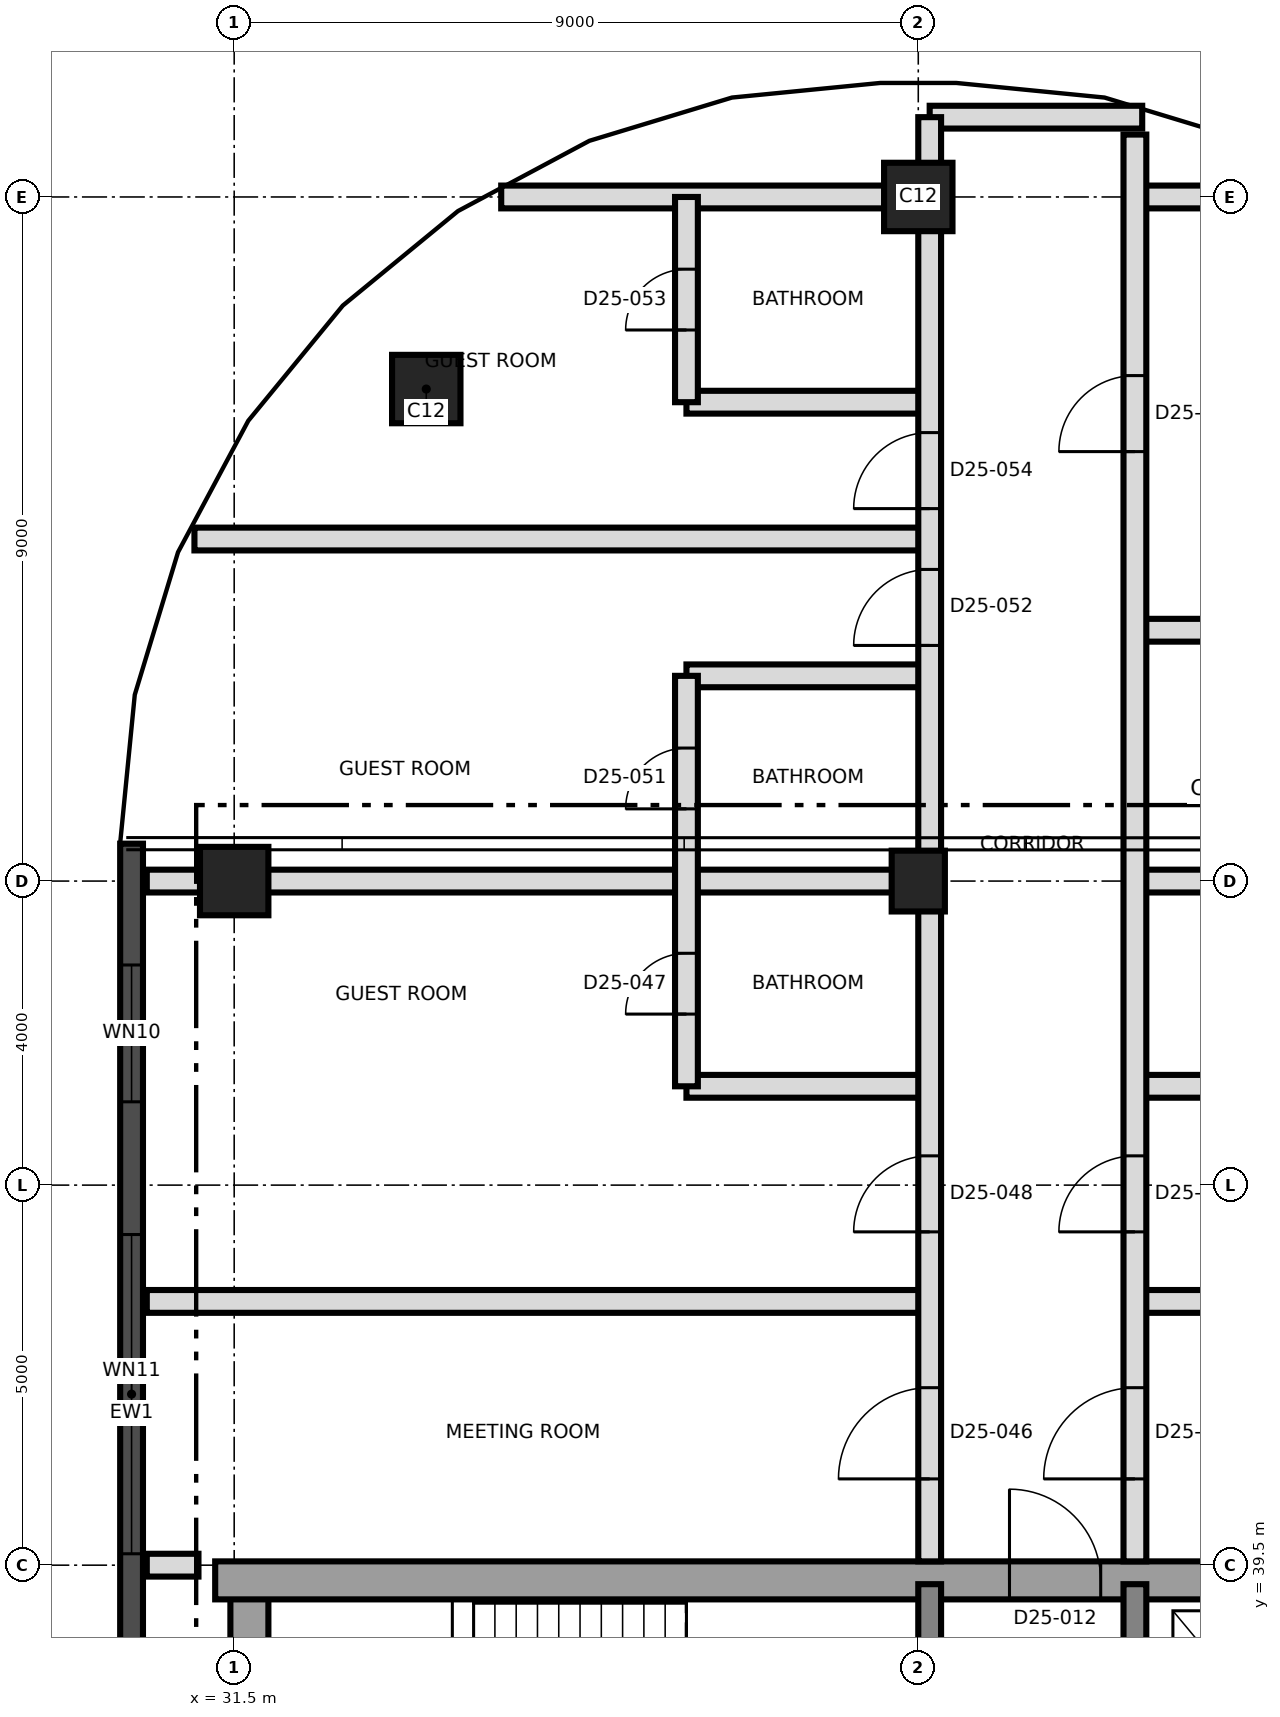
"""IFC4 building model, lengths in metres.
Left out: names, types, materials, properties, quantities, classifications, styles, units other than length and angle.
Written with IfcOpenShell. Run it as: python <this file> out.ifc"""

import sys

from ifc_helpers import new_model, si_unit, direction, frame, frame_2d, origin, origin_2d, place, context, subcontext, project, spatial, rectangle, extrude, element, fill, save


model = new_model("IFC4")
c1 = context("Model", 3, precision=1e-05, world=origin(), true_north=direction((0.0, 1.0)))
c2 = subcontext(c1, "Body", "Model", "MODEL_VIEW")
j1 = project(units=[si_unit("LENGTHUNIT", "METRE"), si_unit("PLANEANGLEUNIT", "RADIAN")], contexts=[c1])
p1 = place(None, origin())
s1 = spatial("IfcSite", under=j1, at=p1, CompositionType="ELEMENT")
p2 = place(p1, origin())
s2 = spatial("IfcBuilding", under=s1, at=p2, CompositionType="ELEMENT")
p3 = place(p2, frame((0.0, 0.0, 229.1)))
s3 = spatial("IfcBuildingStorey", under=s2, at=p3, CompositionType="ELEMENT", Elevation=229.1)
p4 = place(p3, frame((31.7, 21.75, 0.0), z_axis=(0.0, 0.0, 1.0), x_axis=(0.0, 1.0, 0.0)))
e1 = element("IfcWall", 1, at=p4, inside=s3, PredefinedType="SHEAR", context=c2, shape_type="SweptSolid", body=[
    extrude(rectangle(XDim=17.5, YDim=0.5, at=frame_2d((8.75, 0.0))), origin(), (0.0, 0.0, 1.0), 3.7),
])
p5 = place(p3, frame((31.25, 39.3, 0.0), z_axis=(0.0, 0.0, 1.0), x_axis=(1.0, 0.0, 0.0)))
e2 = element("IfcWall", 2, at=p5, inside=s3, PredefinedType="SHEAR", context=c2, shape_type="SweptSolid", body=[
    extrude(rectangle(XDim=27.0, YDim=0.5, at=frame_2d((13.5, 0.0))), origin(), (0.0, 0.0, 1.0), 3.7),
])
p6 = place(p5, frame((10.45, 0.0, 0.0)))
e3 = element("IfcOpeningElement", 3, at=p6, cuts=e2, PredefinedType="OPENING", context=c2, shape_type="SweptSolid", body=[
    extrude(rectangle(XDim=1.2, YDim=2.1, at=frame_2d((0.6, 1.05))), frame((0.0, 0.26, 0.0), z_axis=(0.0, -1.0, 0.0), x_axis=(1.0, 0.0, 0.0)), (0.0, 0.0, 1.0), 0.52),
])
for number, where, z_axis, x_axis in (
    (4, (40.65, 33.5, 0.0), (0.0, 0.0, 1.0), (0.0, 1.0, 0.0)),
    (5, (43.35, 33.5, 0.0), (0.0, 0.0, 1.0), (0.0, 1.0, 0.0)),
):
    element("IfcWall", number, at=place(p3, frame(where, z_axis=z_axis, x_axis=x_axis)), inside=s3, PredefinedType="SHEAR", context=c2, shape_type="SweptSolid", body=[
        extrude(rectangle(XDim=5.75, YDim=0.3, at=frame_2d((2.875, 0.0))), origin(), (0.0, 0.0, 1.0), 3.7),
    ])
p7 = place(p3, frame((31.5, 48.5, 0.0), z_axis=(0.0, 0.0, 1.0), x_axis=(1.0, 0.0, 0.0)))
e6 = element("IfcColumn", 6, at=p7, inside=s3, PredefinedType="COLUMN", context=c2, shape_type="SweptSolid", body=[
    extrude(rectangle(XDim=0.9, YDim=0.9, at=origin_2d()), origin(), (0.0, 0.0, 1.0), 3.7),
])
p8 = place(p3, frame((40.5, 48.5, 0.0), z_axis=(0.0, 0.0, 1.0), x_axis=(0.0, 1.0, 0.0)))
e7 = element("IfcColumn", 7, at=p8, inside=s3, PredefinedType="COLUMN", context=c2, shape_type="SweptSolid", body=[
    extrude(rectangle(XDim=0.8, YDim=0.7, at=origin_2d()), origin(), (0.0, 0.0, 1.0), 3.7),
])
for number, where, z_axis, x_axis in (
    (8, (34.027, 54.973, 0.0), (0.0, 0.0, 1.0), (1.0, 0.0, 0.0)),
    (9, (40.5, 57.5, 0.0), (0.0, 0.0, 1.0), (1.0, 0.0, 0.0)),
):
    element("IfcColumn", number, at=place(p3, frame(where, z_axis=z_axis, x_axis=x_axis)), inside=s3, PredefinedType="COLUMN", context=c2, shape_type="SweptSolid", body=[
        extrude(rectangle(XDim=0.9, YDim=0.9, at=origin_2d()), origin(), (0.0, 0.0, 1.0), 3.7),
    ])
p9 = place(p3, frame((30.15, 48.992, 0.0), z_axis=(0.0, 0.0, 1.0), x_axis=(0.0, -1.0, 0.0)))
e10 = element("IfcWall", 10, at=p9, inside=s3, PredefinedType="SOLIDWALL", context=c2, shape_type="SweptSolid", body=[
    extrude(rectangle(XDim=14.968, YDim=0.3, at=frame_2d((7.484, 0.0))), origin(), (0.0, 0.0, 1.0), 3.4),
])
p10 = place(p9, frame((1.596, 0.0, 0.3)))
e11 = element("IfcOpeningElement", 11, at=p10, cuts=e10, PredefinedType="OPENING", context=c2, shape_type="SweptSolid", body=[
    extrude(rectangle(XDim=1.8, YDim=2.4, at=frame_2d((0.9, 1.2))), frame((0.0, 0.16, 0.0), z_axis=(0.0, -1.0, 0.0), x_axis=(1.0, 0.0, 0.0)), (0.0, 0.0, 1.0), 0.32),
])
p11 = place(p9, frame((5.142, 0.0, 0.9)))
e12 = element("IfcOpeningElement", 12, at=p11, cuts=e10, PredefinedType="OPENING", context=c2, shape_type="SweptSolid", body=[
    extrude(rectangle(XDim=4.2, YDim=1.5, at=frame_2d((2.1, 0.75))), frame((0.0, 0.16, 0.0), z_axis=(0.0, -1.0, 0.0), x_axis=(1.0, 0.0, 0.0)), (0.0, 0.0, 1.0), 0.32),
])
p12 = place(p9, frame((11.33, 0.0, 0.3)))
e13 = element("IfcOpeningElement", 13, at=p12, cuts=e10, PredefinedType="OPENING", context=c2, shape_type="SweptSolid", body=[
    extrude(rectangle(XDim=1.8, YDim=2.4, at=frame_2d((0.9, 1.2))), frame((0.0, 0.16, 0.0), z_axis=(0.0, -1.0, 0.0), x_axis=(1.0, 0.0, 0.0)), (0.0, 0.0, 1.0), 0.32),
])
p13 = place(p3, frame((30.35, 39.5, 0.0), z_axis=(0.0, 0.0, 1.0), x_axis=(1.0, 0.0, 0.0)))
e14 = element("IfcWall", 14, at=p13, inside=s3, PredefinedType="PARTITIONING", context=c2, shape_type="SweptSolid", body=[
    extrude(rectangle(XDim=0.68, YDim=0.3, at=frame_2d((0.34, 0.0))), origin(), (0.0, 0.0, 1.0), 3.4),
])
p14 = place(p3, frame((30.35, 42.97, 0.0), z_axis=(0.0, 0.0, 1.0), x_axis=(1.0, 0.0, 0.0)))
e15 = element("IfcWall", 15, at=p14, inside=s3, PredefinedType="PARTITIONING", context=c2, shape_type="SweptSolid", body=[
    extrude(rectangle(XDim=10.3, YDim=0.3, at=frame_2d((5.15, 0.0))), origin(), (0.0, 0.0, 1.0), 3.4),
])
p15 = place(p3, frame((43.35, 42.97, 0.0), z_axis=(0.0, 0.0, 1.0), x_axis=(1.0, 0.0, 0.0)))
e16 = element("IfcWall", 16, at=p15, inside=s3, PredefinedType="PARTITIONING", context=c2, shape_type="SweptSolid", body=[
    extrude(rectangle(XDim=8.402, YDim=0.3, at=frame_2d((4.201, 0.0))), origin(), (0.0, 0.0, 1.0), 3.4),
])
for number, where, z_axis, x_axis in (
    (17, (37.45, 45.8, 0.0), (0.0, 0.0, 1.0), (1.0, 0.0, 0.0)),
    (18, (43.35, 45.8, 0.0), (0.0, 0.0, 1.0), (1.0, 0.0, 0.0)),
):
    element("IfcWall", number, at=place(p3, frame(where, z_axis=z_axis, x_axis=x_axis)), inside=s3, PredefinedType="PARTITIONING", context=c2, shape_type="SweptSolid", body=[
        extrude(rectangle(XDim=3.2, YDim=0.3, at=frame_2d((1.6, 0.0))), origin(), (0.0, 0.0, 1.0), 3.4),
    ])
p16 = place(p3, frame((30.35, 48.5, 0.0), z_axis=(0.0, 0.0, 1.0), x_axis=(1.0, 0.0, 0.0)))
e19 = element("IfcWall", 19, at=p16, inside=s3, PredefinedType="PARTITIONING", context=c2, shape_type="SweptSolid", body=[
    extrude(rectangle(XDim=10.3, YDim=0.3, at=frame_2d((5.15, 0.0))), origin(), (0.0, 0.0, 1.0), 3.4),
])
p17 = place(p3, frame((43.35, 48.5, 0.0), z_axis=(0.0, 0.0, 1.0), x_axis=(1.0, 0.0, 0.0)))
e20 = element("IfcWall", 20, at=p17, inside=s3, PredefinedType="PARTITIONING", context=c2, shape_type="SweptSolid", body=[
    extrude(rectangle(XDim=7.48, YDim=0.3, at=frame_2d((3.74, 0.0))), origin(), (0.0, 0.0, 1.0), 3.4),
])
p18 = place(p3, frame((37.45, 51.2, 0.0), z_axis=(0.0, 0.0, 1.0), x_axis=(1.0, 0.0, 0.0)))
e21 = element("IfcWall", 21, at=p18, inside=s3, PredefinedType="PARTITIONING", context=c2, shape_type="SweptSolid", body=[
    extrude(rectangle(XDim=3.2, YDim=0.3, at=frame_2d((1.6, 0.0))), origin(), (0.0, 0.0, 1.0), 3.4),
])
p19 = place(p3, frame((43.35, 51.8, 0.0), z_axis=(0.0, 0.0, 1.0), x_axis=(1.0, 0.0, 0.0)))
e22 = element("IfcWall", 22, at=p19, inside=s3, PredefinedType="PARTITIONING", context=c2, shape_type="SweptSolid", body=[
    extrude(rectangle(XDim=3.5, YDim=0.3, at=frame_2d((1.75, 0.0))), origin(), (0.0, 0.0, 1.0), 3.4),
])
p20 = place(p3, frame((30.977, 53.0, 0.0), z_axis=(0.0, 0.0, 1.0), x_axis=(1.0, 0.0, 0.0)))
e23 = element("IfcWall", 23, at=p20, inside=s3, PredefinedType="PARTITIONING", context=c2, shape_type="SweptSolid", body=[
    extrude(rectangle(XDim=9.673, YDim=0.3, at=frame_2d((4.836, 0.0))), origin(), (0.0, 0.0, 1.0), 3.4),
])
p21 = place(p3, frame((37.45, 54.8, 0.0), z_axis=(0.0, 0.0, 1.0), x_axis=(1.0, 0.0, 0.0)))
e24 = element("IfcWall", 24, at=p21, inside=s3, PredefinedType="PARTITIONING", context=c2, shape_type="SweptSolid", body=[
    extrude(rectangle(XDim=3.2, YDim=0.3, at=frame_2d((1.6, 0.0))), origin(), (0.0, 0.0, 1.0), 3.4),
])
p22 = place(p3, frame((35.013, 57.5, 0.0), z_axis=(0.0, 0.0, 1.0), x_axis=(1.0, 0.0, 0.0)))
e25 = element("IfcWall", 25, at=p22, inside=s3, PredefinedType="PARTITIONING", context=c2, shape_type="SweptSolid", body=[
    extrude(rectangle(XDim=5.637, YDim=0.3, at=frame_2d((2.818, 0.0))), origin(), (0.0, 0.0, 1.0), 3.4),
])
p23 = place(p3, frame((43.35, 57.5, 0.0), z_axis=(0.0, 0.0, 1.0), x_axis=(1.0, 0.0, 0.0)))
e26 = element("IfcWall", 26, at=p23, inside=s3, PredefinedType="PARTITIONING", context=c2, shape_type="SweptSolid", body=[
    extrude(rectangle(XDim=2.637, YDim=0.3, at=frame_2d((1.318, 0.0))), origin(), (0.0, 0.0, 1.0), 3.4),
])
p24 = place(p3, frame((40.65, 58.55, 0.0), z_axis=(0.0, 0.0, 1.0), x_axis=(1.0, 0.0, 0.0)))
e27 = element("IfcWall", 27, at=p24, inside=s3, PredefinedType="PARTITIONING", context=c2, shape_type="SweptSolid", body=[
    extrude(rectangle(XDim=2.796, YDim=0.3, at=frame_2d((1.398, 0.0))), origin(), (0.0, 0.0, 1.0), 3.4),
])
p25 = place(p3, frame((37.45, 45.8, 0.0), z_axis=(0.0, 0.0, 1.0), x_axis=(0.0, 1.0, 0.0)))
e28 = element("IfcWall", 28, at=p25, inside=s3, PredefinedType="PARTITIONING", context=c2, shape_type="SweptSolid", body=[
    extrude(rectangle(XDim=5.4, YDim=0.3, at=frame_2d((2.7, 0.0))), origin(), (0.0, 0.0, 1.0), 3.4),
])
p26 = place(p25, frame((0.95, 0.0, 0.0)))
e29 = element("IfcOpeningElement", 29, at=p26, cuts=e28, PredefinedType="OPENING", context=c2, shape_type="SweptSolid", body=[
    extrude(rectangle(XDim=0.8, YDim=2.1, at=frame_2d((0.4, 1.05))), frame((0.0, 0.16, 0.0), z_axis=(0.0, -1.0, 0.0), x_axis=(1.0, 0.0, 0.0)), (0.0, 0.0, 1.0), 0.32),
])
p27 = place(p25, frame((3.65, 0.0, 0.0)))
e30 = element("IfcOpeningElement", 30, at=p27, cuts=e28, PredefinedType="OPENING", context=c2, shape_type="SweptSolid", body=[
    extrude(rectangle(XDim=0.8, YDim=2.1, at=frame_2d((0.4, 1.05))), frame((0.0, 0.16, 0.0), z_axis=(0.0, -1.0, 0.0), x_axis=(1.0, 0.0, 0.0)), (0.0, 0.0, 1.0), 0.32),
])
p28 = place(p3, frame((37.45, 54.8, 0.0), z_axis=(0.0, 0.0, 1.0), x_axis=(0.0, 1.0, 0.0)))
e31 = element("IfcWall", 31, at=p28, inside=s3, PredefinedType="PARTITIONING", context=c2, shape_type="SweptSolid", body=[
    extrude(rectangle(XDim=2.7, YDim=0.3, at=frame_2d((1.35, 0.0))), origin(), (0.0, 0.0, 1.0), 3.4),
])
p29 = place(p28, frame((0.95, 0.0, 0.0)))
e32 = element("IfcOpeningElement", 32, at=p29, cuts=e31, PredefinedType="OPENING", context=c2, shape_type="SweptSolid", body=[
    extrude(rectangle(XDim=0.8, YDim=2.1, at=frame_2d((0.4, 1.05))), frame((0.0, 0.16, 0.0), z_axis=(0.0, -1.0, 0.0), x_axis=(1.0, 0.0, 0.0)), (0.0, 0.0, 1.0), 0.32),
])
p30 = place(p3, frame((40.65, 39.55, 0.0), z_axis=(0.0, 0.0, 1.0), x_axis=(0.0, 1.0, 0.0)))
e33 = element("IfcWall", 33, at=p30, inside=s3, PredefinedType="PARTITIONING", context=c2, shape_type="SweptSolid", body=[
    extrude(rectangle(XDim=19.0, YDim=0.3, at=frame_2d((9.5, 0.0))), origin(), (0.0, 0.0, 1.0), 3.4),
])
p31 = place(p30, frame((1.085, 0.0, 0.0)))
e34 = element("IfcOpeningElement", 34, at=p31, cuts=e33, PredefinedType="OPENING", context=c2, shape_type="SweptSolid", body=[
    extrude(rectangle(XDim=1.2, YDim=2.1, at=frame_2d((0.6, 1.05))), frame((0.0, 0.16, 0.0), z_axis=(0.0, -1.0, 0.0), x_axis=(1.0, 0.0, 0.0)), (0.0, 0.0, 1.0), 0.32),
])
p32 = place(p30, frame((4.335, 0.0, 0.0)))
e35 = element("IfcOpeningElement", 35, at=p32, cuts=e33, PredefinedType="OPENING", context=c2, shape_type="SweptSolid", body=[
    extrude(rectangle(XDim=1.0, YDim=2.1, at=frame_2d((0.5, 1.05))), frame((0.0, 0.16, 0.0), z_axis=(0.0, -1.0, 0.0), x_axis=(1.0, 0.0, 0.0)), (0.0, 0.0, 1.0), 0.32),
])
p33 = place(p30, frame((12.05, 0.0, 0.0)))
e36 = element("IfcOpeningElement", 36, at=p33, cuts=e33, PredefinedType="OPENING", context=c2, shape_type="SweptSolid", body=[
    extrude(rectangle(XDim=1.0, YDim=2.1, at=frame_2d((0.5, 1.05))), frame((0.0, 0.16, 0.0), z_axis=(0.0, -1.0, 0.0), x_axis=(1.0, 0.0, 0.0)), (0.0, 0.0, 1.0), 0.32),
])
p34 = place(p30, frame((13.85, 0.0, 0.0)))
e37 = element("IfcOpeningElement", 37, at=p34, cuts=e33, PredefinedType="OPENING", context=c2, shape_type="SweptSolid", body=[
    extrude(rectangle(XDim=1.0, YDim=2.1, at=frame_2d((0.5, 1.05))), frame((0.0, 0.16, 0.0), z_axis=(0.0, -1.0, 0.0), x_axis=(1.0, 0.0, 0.0)), (0.0, 0.0, 1.0), 0.32),
])
p35 = place(p3, frame((43.35, 39.55, 0.0), z_axis=(0.0, 0.0, 1.0), x_axis=(0.0, 1.0, 0.0)))
e38 = element("IfcWall", 38, at=p35, inside=s3, PredefinedType="PARTITIONING", context=c2, shape_type="SweptSolid", body=[
    extrude(rectangle(XDim=18.771, YDim=0.3, at=frame_2d((9.385, 0.0))), origin(), (0.0, 0.0, 1.0), 3.4),
])
p36 = place(p35, frame((1.085, 0.0, 0.0)))
e39 = element("IfcOpeningElement", 39, at=p36, cuts=e38, PredefinedType="OPENING", context=c2, shape_type="SweptSolid", body=[
    extrude(rectangle(XDim=1.2, YDim=2.1, at=frame_2d((0.6, 1.05))), frame((0.0, 0.16, 0.0), z_axis=(0.0, -1.0, 0.0), x_axis=(1.0, 0.0, 0.0)), (0.0, 0.0, 1.0), 0.32),
])
p37 = place(p35, frame((4.335, 0.0, 0.0)))
e40 = element("IfcOpeningElement", 40, at=p37, cuts=e38, PredefinedType="OPENING", context=c2, shape_type="SweptSolid", body=[
    extrude(rectangle(XDim=1.0, YDim=2.1, at=frame_2d((0.5, 1.05))), frame((0.0, 0.16, 0.0), z_axis=(0.0, -1.0, 0.0), x_axis=(1.0, 0.0, 0.0)), (0.0, 0.0, 1.0), 0.32),
])
p38 = place(p35, frame((14.6, 0.0, 0.0)))
e41 = element("IfcOpeningElement", 41, at=p38, cuts=e38, PredefinedType="OPENING", context=c2, shape_type="SweptSolid", body=[
    extrude(rectangle(XDim=1.0, YDim=2.4, at=frame_2d((0.5, 1.2))), frame((0.0, 0.16, 0.0), z_axis=(0.0, -1.0, 0.0), x_axis=(1.0, 0.0, 0.0)), (0.0, 0.0, 1.0), 0.32),
])
p39 = place(p10, origin())
e42 = element("IfcWindow", 42, at=p39, inside=s3, PartitioningType="SINGLE_PANEL", PredefinedType="WINDOW", context=c2, shape_type="SweptSolid", body=[
    extrude(rectangle(XDim=1.8, YDim=2.4, at=frame_2d((0.9, 1.2))), frame((0.0, 0.03, 0.0), z_axis=(0.0, -1.0, 0.0), x_axis=(1.0, 0.0, 0.0)), (0.0, 0.0, 1.0), 0.06),
])
fill(e11, e42)
p40 = place(p11, origin())
e43 = element("IfcWindow", 43, at=p40, inside=s3, PartitioningType="SINGLE_PANEL", PredefinedType="WINDOW", context=c2, shape_type="SweptSolid", body=[
    extrude(rectangle(XDim=4.2, YDim=1.5, at=frame_2d((2.1, 0.75))), frame((0.0, 0.03, 0.0), z_axis=(0.0, -1.0, 0.0), x_axis=(1.0, 0.0, 0.0)), (0.0, 0.0, 1.0), 0.06),
])
fill(e12, e43)
p41 = place(p6, origin())
e44 = element("IfcDoor", 44, at=p41, inside=s3, OperationType="SINGLE_SWING_RIGHT", PredefinedType="DOOR", context=c2, shape_type="SweptSolid", body=[
    extrude(rectangle(XDim=1.2, YDim=2.1, at=frame_2d((0.6, 1.05))), frame((0.0, 0.025, 0.0), z_axis=(0.0, -1.0, 0.0), x_axis=(1.0, 0.0, 0.0)), (0.0, 0.0, 1.0), 0.05),
])
fill(e3, e44)
p42 = place(p36, origin())
e45 = element("IfcDoor", 45, at=p42, inside=s3, OperationType="SINGLE_SWING_RIGHT", PredefinedType="DOOR", context=c2, shape_type="SweptSolid", body=[
    extrude(rectangle(XDim=1.2, YDim=2.1, at=frame_2d((0.6, 1.05))), frame((0.0, 0.025, 0.0), z_axis=(0.0, -1.0, 0.0), x_axis=(1.0, 0.0, 0.0)), (0.0, 0.0, 1.0), 0.05),
])
fill(e39, e45)
p43 = place(p37, origin())
e46 = element("IfcDoor", 46, at=p43, inside=s3, OperationType="SINGLE_SWING_LEFT", PredefinedType="DOOR", context=c2, shape_type="SweptSolid", body=[
    extrude(rectangle(XDim=1.0, YDim=2.1, at=frame_2d((0.5, 1.05))), frame((0.0, 0.025, 0.0), z_axis=(0.0, -1.0, 0.0), x_axis=(1.0, 0.0, 0.0)), (0.0, 0.0, 1.0), 0.05),
])
fill(e40, e46)
p44 = place(p31, origin())
e47 = element("IfcDoor", 47, at=p44, inside=s3, OperationType="SINGLE_SWING_RIGHT", PredefinedType="DOOR", context=c2, shape_type="SweptSolid", body=[
    extrude(rectangle(XDim=1.2, YDim=2.1, at=frame_2d((0.6, 1.05))), frame((0.0, 0.025, 0.0), z_axis=(0.0, -1.0, 0.0), x_axis=(1.0, 0.0, 0.0)), (0.0, 0.0, 1.0), 0.05),
])
fill(e34, e47)
p45 = place(p26, origin())
e48 = element("IfcDoor", 48, at=p45, inside=s3, OperationType="SINGLE_SWING_LEFT", PredefinedType="DOOR", context=c2, shape_type="SweptSolid", body=[
    extrude(rectangle(XDim=0.8, YDim=2.1, at=frame_2d((0.4, 1.05))), frame((0.0, 0.025, 0.0), z_axis=(0.0, -1.0, 0.0), x_axis=(1.0, 0.0, 0.0)), (0.0, 0.0, 1.0), 0.05),
])
fill(e29, e48)
p46 = place(p32, origin())
e49 = element("IfcDoor", 49, at=p46, inside=s3, OperationType="SINGLE_SWING_LEFT", PredefinedType="DOOR", context=c2, shape_type="SweptSolid", body=[
    extrude(rectangle(XDim=1.0, YDim=2.1, at=frame_2d((0.5, 1.05))), frame((0.0, 0.025, 0.0), z_axis=(0.0, -1.0, 0.0), x_axis=(1.0, 0.0, 0.0)), (0.0, 0.0, 1.0), 0.05),
])
fill(e35, e49)
p47 = place(p38, origin())
e50 = element("IfcDoor", 50, at=p47, inside=s3, OperationType="SINGLE_SWING_RIGHT", PredefinedType="DOOR", context=c2, shape_type="SweptSolid", body=[
    extrude(rectangle(XDim=1.0, YDim=2.4, at=frame_2d((0.5, 1.2))), frame((0.0, 0.025, 0.0), z_axis=(0.0, -1.0, 0.0), x_axis=(1.0, 0.0, 0.0)), (0.0, 0.0, 1.0), 0.05),
])
fill(e41, e50)
p48 = place(p27, origin())
e51 = element("IfcDoor", 51, at=p48, inside=s3, OperationType="SINGLE_SWING_RIGHT", PredefinedType="DOOR", context=c2, shape_type="SweptSolid", body=[
    extrude(rectangle(XDim=0.8, YDim=2.1, at=frame_2d((0.4, 1.05))), frame((0.0, 0.025, 0.0), z_axis=(0.0, -1.0, 0.0), x_axis=(1.0, 0.0, 0.0)), (0.0, 0.0, 1.0), 0.05),
])
fill(e30, e51)
p49 = place(p33, origin())
e52 = element("IfcDoor", 52, at=p49, inside=s3, OperationType="SINGLE_SWING_LEFT", PredefinedType="DOOR", context=c2, shape_type="SweptSolid", body=[
    extrude(rectangle(XDim=1.0, YDim=2.1, at=frame_2d((0.5, 1.05))), frame((0.0, 0.025, 0.0), z_axis=(0.0, -1.0, 0.0), x_axis=(1.0, 0.0, 0.0)), (0.0, 0.0, 1.0), 0.05),
])
fill(e36, e52)
p50 = place(p29, origin())
e53 = element("IfcDoor", 53, at=p50, inside=s3, OperationType="SINGLE_SWING_LEFT", PredefinedType="DOOR", context=c2, shape_type="SweptSolid", body=[
    extrude(rectangle(XDim=0.8, YDim=2.1, at=frame_2d((0.4, 1.05))), frame((0.0, 0.025, 0.0), z_axis=(0.0, -1.0, 0.0), x_axis=(1.0, 0.0, 0.0)), (0.0, 0.0, 1.0), 0.05),
])
fill(e32, e53)
p51 = place(p34, origin())
e54 = element("IfcDoor", 54, at=p51, inside=s3, OperationType="SINGLE_SWING_LEFT", PredefinedType="DOOR", context=c2, shape_type="SweptSolid", body=[
    extrude(rectangle(XDim=1.0, YDim=2.1, at=frame_2d((0.5, 1.05))), frame((0.0, 0.025, 0.0), z_axis=(0.0, -1.0, 0.0), x_axis=(1.0, 0.0, 0.0)), (0.0, 0.0, 1.0), 0.05),
])
fill(e37, e54)
save(model, sys.argv[1])
